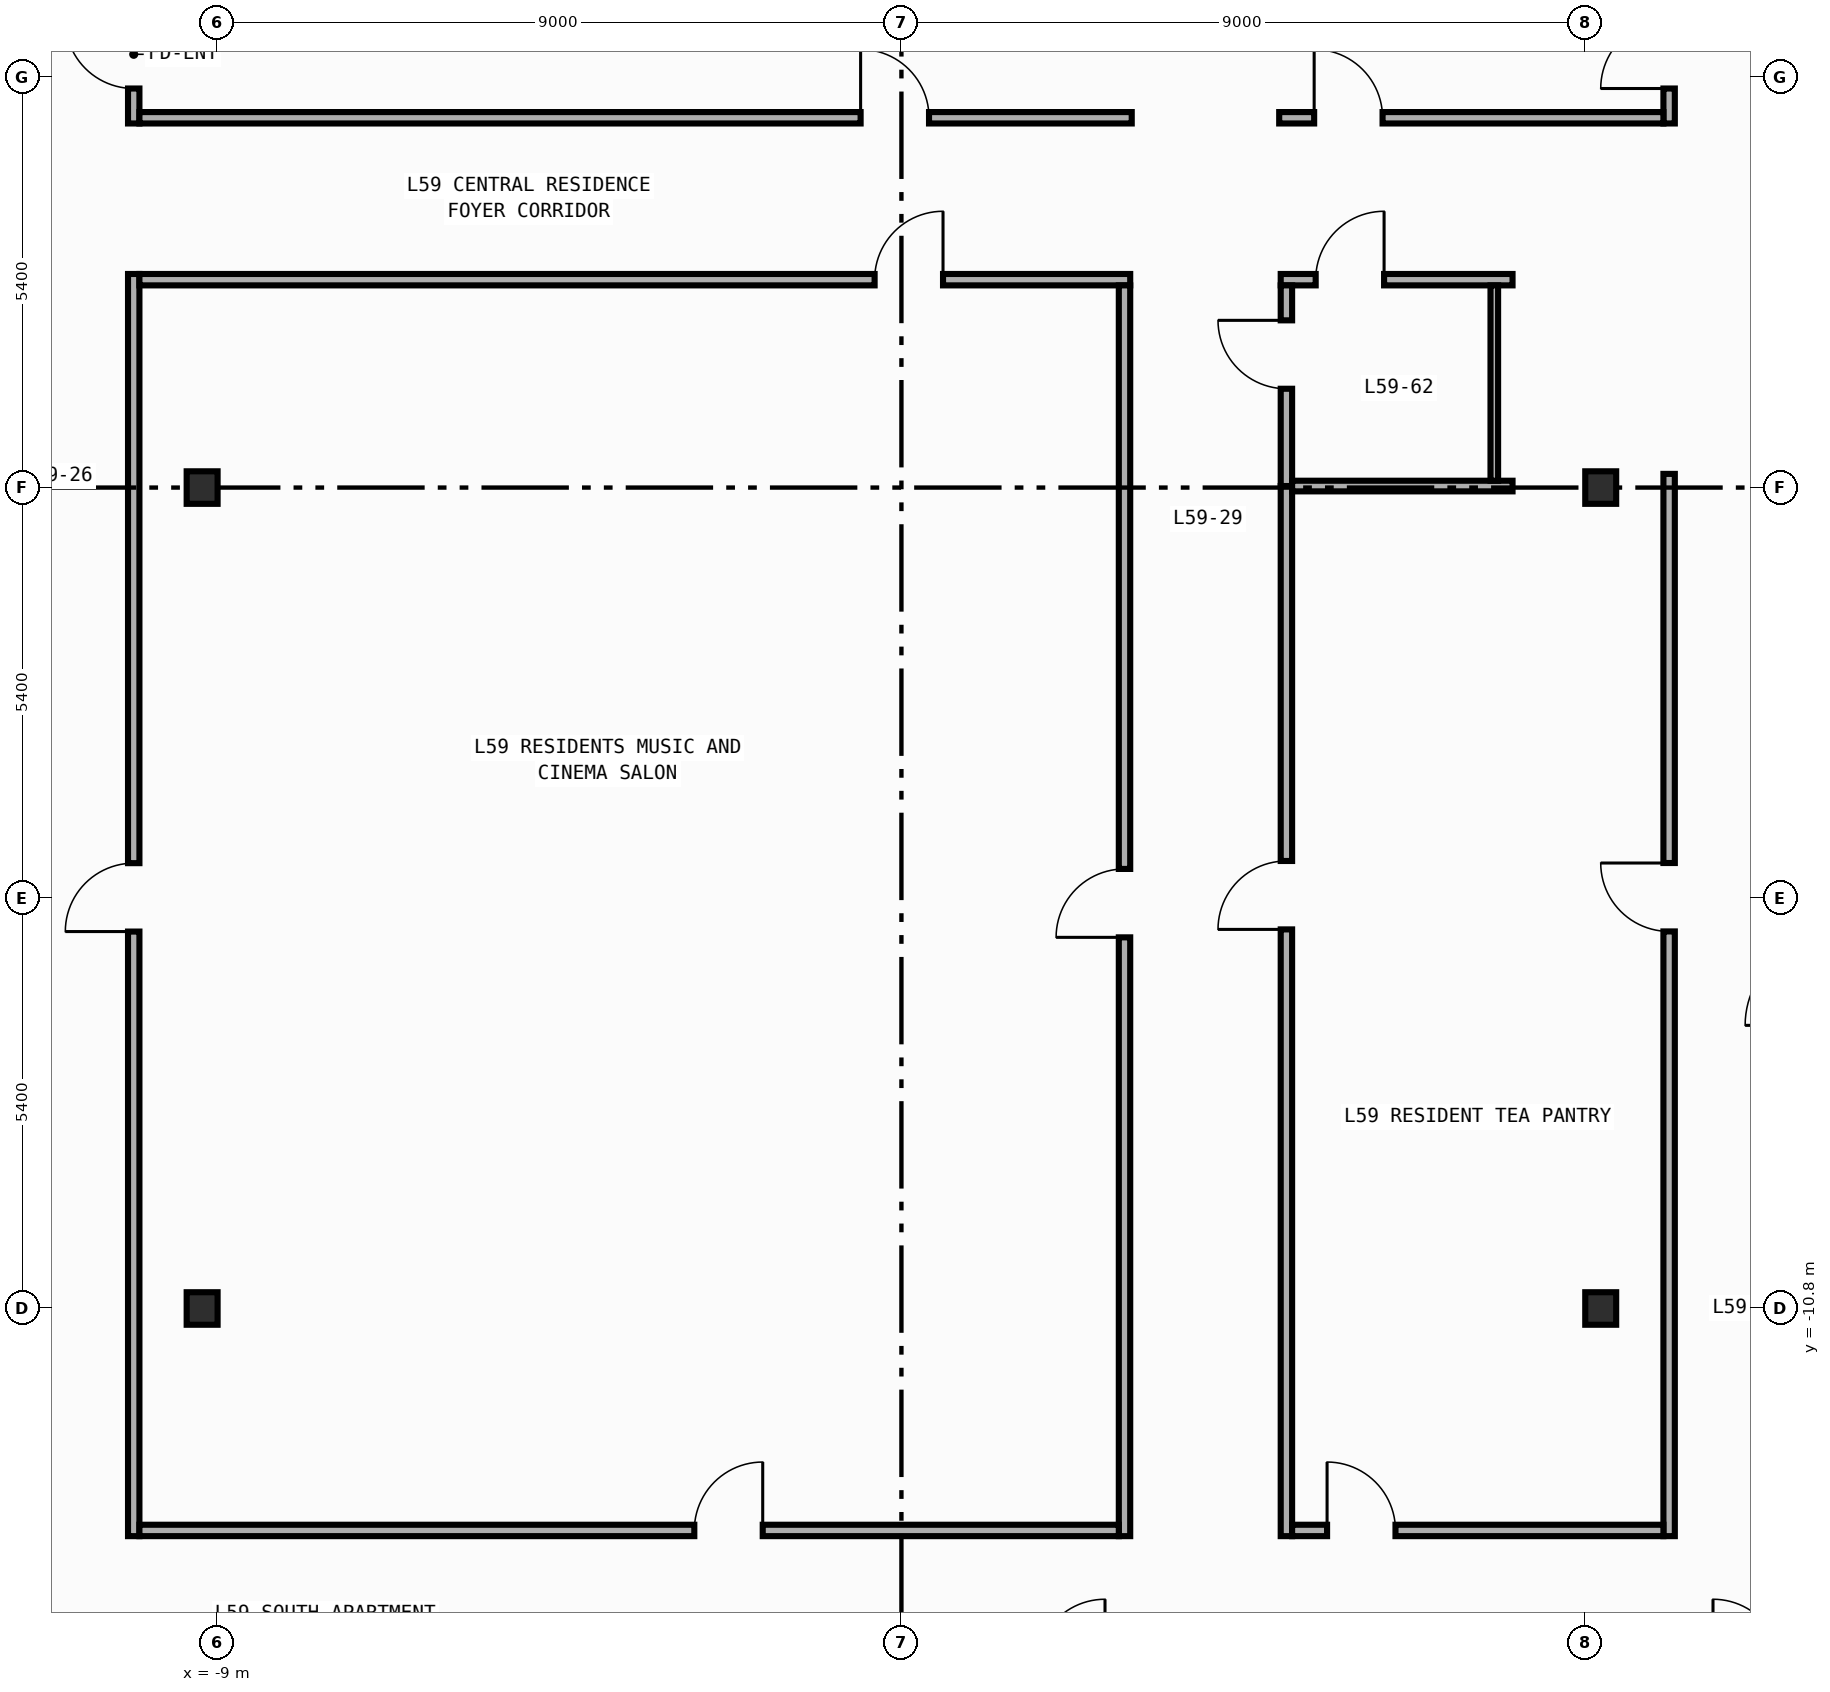
"""IFC4 building model, lengths in metres.
Left out: names, types, materials, properties, quantities, classifications, styles, units other than length and angle.
Written with IfcOpenShell. Run it as: python <this file> out.ifc"""

import sys

from ifc_helpers import new_model, si_unit, direction, frame, frame_2d, origin, origin_2d, place, context, subcontext, project, spatial, rectangle, i_section, extrude, element, fill, save


model = new_model("IFC4")
c1 = context("Model", 3, precision=1e-05, world=origin(), true_north=direction((0.0, 1.0)))
c2 = subcontext(c1, "Body", "Model", "MODEL_VIEW")
j1 = project(units=[si_unit("LENGTHUNIT", "METRE"), si_unit("PLANEANGLEUNIT", "RADIAN")], contexts=[c1])
p1 = place(None, origin())
s1 = spatial("IfcSite", under=j1, at=p1, CompositionType="ELEMENT")
p2 = place(p1, origin())
s2 = spatial("IfcBuilding", under=s1, at=p2, CompositionType="ELEMENT")
p3 = place(p2, frame((0.0, 0.0, 251.2)))
s3 = spatial("IfcBuildingStorey", under=s2, at=p3, CompositionType="ELEMENT", Elevation=251.2)
for number, where, z_axis, x_axis in (
    (1, (-9.2, -10.8, 0.0), (0.0, 0.0, 1.0), (1.0, 0.0, 0.0)),
    (2, (-9.2, 0.0, 0.0), (0.0, 0.0, 1.0), (1.0, 0.0, 0.0)),
    (3, (9.2, -10.8, 0.0), (0.0, 0.0, 1.0), (1.0, 0.0, 0.0)),
    (4, (9.2, 0.0, 0.0), (0.0, 0.0, 1.0), (1.0, 0.0, 0.0)),
):
    element("IfcColumn", number, at=place(p3, frame(where, z_axis=z_axis, x_axis=x_axis)), inside=s3, PredefinedType="COLUMN", context=c2, shape_type="SweptSolid", body=[
        extrude(i_section(OverallWidth=0.407, OverallDepth=0.428, WebThickness=0.02, FlangeThickness=0.035, FilletRadius=0.022, at=origin_2d()), origin(), (0.0, 0.0, 1.0), 3.6),
    ])
p4 = place(p3, frame((-10.1, 4.79, 0.0), z_axis=(0.0, 0.0, 1.0), x_axis=(0.0, 1.0, 0.0)))
e5 = element("IfcWall", 5, at=p4, inside=s3, PredefinedType="PARTITIONING", context=c2, shape_type="SweptSolid", body=[
    extrude(rectangle(XDim=9.005, YDim=0.15, at=frame_2d((4.502, 0.0))), origin(), (0.0, 0.0, 1.0), 3.34),
])
p5 = place(p4, frame((0.46, 0.0, 0.0)))
e6 = element("IfcOpeningElement", 6, at=p5, cuts=e5, PredefinedType="OPENING", context=c2, shape_type="SweptSolid", body=[
    extrude(rectangle(XDim=0.9, YDim=2.15, at=frame_2d((0.45, 1.075))), frame((0.0, 0.085, 0.0), z_axis=(0.0, -1.0, 0.0), x_axis=(1.0, 0.0, 0.0)), (0.0, 0.0, 1.0), 0.17),
])
p6 = place(p3, frame((-10.1, -13.795, 0.0), z_axis=(0.0, 0.0, 1.0), x_axis=(0.0, 1.0, 0.0)))
e7 = element("IfcWall", 7, at=p6, inside=s3, PredefinedType="PARTITIONING", context=c2, shape_type="SweptSolid", body=[
    extrude(rectangle(XDim=16.605, YDim=0.15, at=frame_2d((8.302, 0.0))), origin(), (0.0, 0.0, 1.0), 3.34),
])
p7 = place(p6, frame((7.954, 0.0, 0.0)))
e8 = element("IfcOpeningElement", 8, at=p7, cuts=e7, PredefinedType="OPENING", context=c2, shape_type="SweptSolid", body=[
    extrude(rectangle(XDim=0.9, YDim=2.15, at=frame_2d((0.45, 1.075))), frame((0.0, 0.085, 0.0), z_axis=(0.0, -1.0, 0.0), x_axis=(1.0, 0.0, 0.0)), (0.0, 0.0, 1.0), 0.17),
])
p8 = place(p3, frame((10.1, 4.79, 0.0), z_axis=(0.0, 0.0, 1.0), x_axis=(0.0, 1.0, 0.0)))
e9 = element("IfcWall", 9, at=p8, inside=s3, PredefinedType="PARTITIONING", context=c2, shape_type="SweptSolid", body=[
    extrude(rectangle(XDim=9.005, YDim=0.15, at=frame_2d((4.502, 0.0))), origin(), (0.0, 0.0, 1.0), 3.34),
])
p9 = place(p8, frame((0.46, 0.0, 0.0)))
e10 = element("IfcOpeningElement", 10, at=p9, cuts=e9, PredefinedType="OPENING", context=c2, shape_type="SweptSolid", body=[
    extrude(rectangle(XDim=0.9, YDim=2.15, at=frame_2d((0.45, 1.075))), frame((0.0, 0.085, 0.0), z_axis=(0.0, -1.0, 0.0), x_axis=(1.0, 0.0, 0.0)), (0.0, 0.0, 1.0), 0.17),
])
p10 = place(p3, frame((10.1, -13.795, 0.0), z_axis=(0.0, 0.0, 1.0), x_axis=(0.0, 1.0, 0.0)))
e11 = element("IfcWall", 11, at=p10, inside=s3, PredefinedType="PARTITIONING", context=c2, shape_type="SweptSolid", body=[
    extrude(rectangle(XDim=13.975, YDim=0.15, at=frame_2d((6.987, 0.0))), origin(), (0.0, 0.0, 1.0), 3.34),
])
p11 = place(p10, frame((7.956, 0.0, 0.0)))
e12 = element("IfcOpeningElement", 12, at=p11, cuts=e11, PredefinedType="OPENING", context=c2, shape_type="SweptSolid", body=[
    extrude(rectangle(XDim=0.9, YDim=2.15, at=frame_2d((0.45, 1.075))), frame((0.0, 0.085, 0.0), z_axis=(0.0, -1.0, 0.0), x_axis=(1.0, 0.0, 0.0)), (0.0, 0.0, 1.0), 0.17),
])
p12 = place(p3, frame((-10.025, 4.865, 0.0), z_axis=(0.0, 0.0, 1.0), x_axis=(1.0, 0.0, 0.0)))
e13 = element("IfcWall", 13, at=p12, inside=s3, PredefinedType="PARTITIONING", context=c2, shape_type="SweptSolid", body=[
    extrude(rectangle(XDim=13.055, YDim=0.15, at=frame_2d((6.527, 0.0))), origin(), (0.0, 0.0, 1.0), 3.34),
])
p13 = place(p12, frame((9.488, 0.0, 0.0)))
e14 = element("IfcOpeningElement", 14, at=p13, cuts=e13, PredefinedType="OPENING", context=c2, shape_type="SweptSolid", body=[
    extrude(rectangle(XDim=0.9, YDim=2.15, at=frame_2d((0.45, 1.075))), frame((0.0, 0.085, 0.0), z_axis=(0.0, -1.0, 0.0), x_axis=(1.0, 0.0, 0.0)), (0.0, 0.0, 1.0), 0.17),
])
p14 = place(p3, frame((-10.025, 2.735, 0.0), z_axis=(0.0, 0.0, 1.0), x_axis=(1.0, 0.0, 0.0)))
e15 = element("IfcWall", 15, at=p14, inside=s3, PredefinedType="PARTITIONING", context=c2, shape_type="SweptSolid", body=[
    extrude(rectangle(XDim=13.035, YDim=0.15, at=frame_2d((6.518, 0.0))), origin(), (0.0, 0.0, 1.0), 3.34),
])
p15 = place(p14, frame((9.672, 0.0, 0.0)))
e16 = element("IfcOpeningElement", 16, at=p15, cuts=e15, PredefinedType="OPENING", context=c2, shape_type="SweptSolid", body=[
    extrude(rectangle(XDim=0.9, YDim=2.15, at=frame_2d((0.45, 1.075))), frame((0.0, 0.085, 0.0), z_axis=(0.0, -1.0, 0.0), x_axis=(1.0, 0.0, 0.0)), (0.0, 0.0, 1.0), 0.17),
])
p16 = place(p3, frame((4.97, 4.865, 0.0), z_axis=(0.0, 0.0, 1.0), x_axis=(1.0, 0.0, 0.0)))
e17 = element("IfcWall", 17, at=p16, inside=s3, PredefinedType="PARTITIONING", context=c2, shape_type="SweptSolid", body=[
    extrude(rectangle(XDim=5.055, YDim=0.15, at=frame_2d((2.527, 0.0))), origin(), (0.0, 0.0, 1.0), 3.34),
])
p17 = place(p16, frame((0.46, 0.0, 0.0)))
e18 = element("IfcOpeningElement", 18, at=p17, cuts=e17, PredefinedType="OPENING", context=c2, shape_type="SweptSolid", body=[
    extrude(rectangle(XDim=0.9, YDim=2.15, at=frame_2d((0.45, 1.075))), frame((0.0, 0.085, 0.0), z_axis=(0.0, -1.0, 0.0), x_axis=(1.0, 0.0, 0.0)), (0.0, 0.0, 1.0), 0.17),
])
p18 = place(p3, frame((4.99, 2.735, 0.0), z_axis=(0.0, 0.0, 1.0), x_axis=(1.0, 0.0, 0.0)))
e19 = element("IfcWall", 19, at=p18, inside=s3, PredefinedType="PARTITIONING", context=c2, shape_type="SweptSolid", body=[
    extrude(rectangle(XDim=3.05, YDim=0.15, at=frame_2d((1.525, 0.0))), origin(), (0.0, 0.0, 1.0), 3.34),
])
p19 = place(p18, frame((0.46, 0.0, 0.0)))
e20 = element("IfcOpeningElement", 20, at=p19, cuts=e19, PredefinedType="OPENING", context=c2, shape_type="SweptSolid", body=[
    extrude(rectangle(XDim=0.9, YDim=2.15, at=frame_2d((0.45, 1.075))), frame((0.0, 0.085, 0.0), z_axis=(0.0, -1.0, 0.0), x_axis=(1.0, 0.0, 0.0)), (0.0, 0.0, 1.0), 0.17),
])
p20 = place(p3, frame((2.935, -13.795, 0.0), z_axis=(0.0, 0.0, 1.0), x_axis=(0.0, 1.0, 0.0)))
e21 = element("IfcWall", 21, at=p20, inside=s3, PredefinedType="PARTITIONING", context=c2, shape_type="SweptSolid", body=[
    extrude(rectangle(XDim=16.455, YDim=0.15, at=frame_2d((8.228, 0.0))), origin(), (0.0, 0.0, 1.0), 3.34),
])
p21 = place(p20, frame((7.878, 0.0, 0.0)))
e22 = element("IfcOpeningElement", 22, at=p21, cuts=e21, PredefinedType="OPENING", context=c2, shape_type="SweptSolid", body=[
    extrude(rectangle(XDim=0.9, YDim=2.15, at=frame_2d((0.45, 1.075))), frame((0.0, 0.085, 0.0), z_axis=(0.0, -1.0, 0.0), x_axis=(1.0, 0.0, 0.0)), (0.0, 0.0, 1.0), 0.17),
])
p22 = place(p3, frame((5.065, 0.02, 0.0), z_axis=(0.0, 0.0, 1.0), x_axis=(0.0, 1.0, 0.0)))
e23 = element("IfcWall", 23, at=p22, inside=s3, PredefinedType="PARTITIONING", context=c2, shape_type="SweptSolid", body=[
    extrude(rectangle(XDim=2.64, YDim=0.15, at=frame_2d((1.32, 0.0))), origin(), (0.0, 0.0, 1.0), 2.99),
])
p23 = place(p22, frame((1.28, 0.0, 0.0)))
e24 = element("IfcOpeningElement", 24, at=p23, cuts=e23, PredefinedType="OPENING", context=c2, shape_type="SweptSolid", body=[
    extrude(rectangle(XDim=0.9, YDim=2.15, at=frame_2d((0.45, 1.075))), frame((0.0, 0.085, 0.0), z_axis=(0.0, -1.0, 0.0), x_axis=(1.0, 0.0, 0.0)), (0.0, 0.0, 1.0), 0.17),
])
p24 = place(p3, frame((5.065, -13.795, 0.0), z_axis=(0.0, 0.0, 1.0), x_axis=(0.0, 1.0, 0.0)))
e25 = element("IfcWall", 25, at=p24, inside=s3, PredefinedType="PARTITIONING", context=c2, shape_type="SweptSolid", body=[
    extrude(rectangle(XDim=13.815, YDim=0.15, at=frame_2d((6.907, 0.0))), origin(), (0.0, 0.0, 1.0), 2.99),
])
p25 = place(p24, frame((7.982, 0.0, 0.0)))
e26 = element("IfcOpeningElement", 26, at=p25, cuts=e25, PredefinedType="OPENING", context=c2, shape_type="SweptSolid", body=[
    extrude(rectangle(XDim=0.9, YDim=2.15, at=frame_2d((0.45, 1.075))), frame((0.0, 0.085, 0.0), z_axis=(0.0, -1.0, 0.0), x_axis=(1.0, 0.0, 0.0)), (0.0, 0.0, 1.0), 0.17),
])
p26 = place(p3, frame((-10.025, -13.72, 0.0), z_axis=(0.0, 0.0, 1.0), x_axis=(1.0, 0.0, 0.0)))
e27 = element("IfcWall", 27, at=p26, inside=s3, PredefinedType="PARTITIONING", context=c2, shape_type="SweptSolid", body=[
    extrude(rectangle(XDim=12.885, YDim=0.15, at=frame_2d((6.442, 0.0))), origin(), (0.0, 0.0, 1.0), 3.34),
])
p27 = place(p26, frame((7.3, 0.0, 0.0)))
e28 = element("IfcOpeningElement", 28, at=p27, cuts=e27, PredefinedType="OPENING", context=c2, shape_type="SweptSolid", body=[
    extrude(rectangle(XDim=0.9, YDim=2.15, at=frame_2d((0.45, 1.075))), frame((0.0, 0.085, 0.0), z_axis=(0.0, -1.0, 0.0), x_axis=(1.0, 0.0, 0.0)), (0.0, 0.0, 1.0), 0.17),
])
p28 = place(p3, frame((5.14, -13.72, 0.0), z_axis=(0.0, 0.0, 1.0), x_axis=(1.0, 0.0, 0.0)))
e29 = element("IfcWall", 29, at=p28, inside=s3, PredefinedType="PARTITIONING", context=c2, shape_type="SweptSolid", body=[
    extrude(rectangle(XDim=4.885, YDim=0.15, at=frame_2d((2.442, 0.0))), origin(), (0.0, 0.0, 1.0), 3.34),
])
p29 = place(p28, frame((0.46, 0.0, 0.0)))
e30 = element("IfcOpeningElement", 30, at=p29, cuts=e29, PredefinedType="OPENING", context=c2, shape_type="SweptSolid", body=[
    extrude(rectangle(XDim=0.9, YDim=2.15, at=frame_2d((0.45, 1.075))), frame((0.0, 0.085, 0.0), z_axis=(0.0, -1.0, 0.0), x_axis=(1.0, 0.0, 0.0)), (0.0, 0.0, 1.0), 0.17),
])
p30 = place(p3, frame((5.14, 0.02, 0.0), z_axis=(0.0, 0.0, 1.0), x_axis=(1.0, 0.0, 0.0)))
e31 = element("IfcWall", 31, at=p30, inside=s3, PredefinedType="PARTITIONING", context=c2, shape_type="SweptSolid", body=[
    extrude(rectangle(XDim=2.9, YDim=0.14, at=frame_2d((1.45, 0.0))), origin(), (0.0, 0.0, 1.0), 2.44),
])
p31 = place(p3, frame((7.8, 2.66, 0.0), z_axis=(0.0, 0.0, 1.0), x_axis=(0.0, -1.0, 0.0)))
e32 = element("IfcWall", 32, at=p31, inside=s3, PredefinedType="PARTITIONING", context=c2, shape_type="SweptSolid", body=[
    extrude(rectangle(XDim=2.57, YDim=0.1, at=frame_2d((1.285, 0.0))), origin(), (0.0, 0.0, 1.0), 3.34),
])
p32 = place(p5, origin())
e33 = element("IfcDoor", 33, at=p32, inside=s3, OperationType="SINGLE_SWING_RIGHT", PredefinedType="DOOR", context=c2, shape_type="SweptSolid", body=[
    extrude(rectangle(XDim=0.9, YDim=2.15, at=frame_2d((0.45, 1.075))), frame((0.0, 0.025, 0.0), z_axis=(0.0, -1.0, 0.0), x_axis=(1.0, 0.0, 0.0)), (0.0, 0.0, 1.0), 0.05),
])
fill(e6, e33)
p33 = place(p7, origin())
e34 = element("IfcDoor", 34, at=p33, inside=s3, OperationType="SINGLE_SWING_LEFT", PredefinedType="DOOR", context=c2, shape_type="SweptSolid", body=[
    extrude(rectangle(XDim=0.9, YDim=2.15, at=frame_2d((0.45, 1.075))), frame((0.0, 0.025, 0.0), z_axis=(0.0, -1.0, 0.0), x_axis=(1.0, 0.0, 0.0)), (0.0, 0.0, 1.0), 0.05),
])
fill(e8, e34)
p34 = place(p9, origin())
e35 = element("IfcDoor", 35, at=p34, inside=s3, OperationType="SINGLE_SWING_LEFT", PredefinedType="DOOR", context=c2, shape_type="SweptSolid", body=[
    extrude(rectangle(XDim=0.9, YDim=2.15, at=frame_2d((0.45, 1.075))), frame((0.0, 0.025, 0.0), z_axis=(0.0, -1.0, 0.0), x_axis=(1.0, 0.0, 0.0)), (0.0, 0.0, 1.0), 0.05),
])
fill(e10, e35)
p35 = place(p11, origin())
e36 = element("IfcDoor", 36, at=p35, inside=s3, OperationType="SINGLE_SWING_RIGHT", PredefinedType="DOOR", context=c2, shape_type="SweptSolid", body=[
    extrude(rectangle(XDim=0.9, YDim=2.15, at=frame_2d((0.45, 1.075))), frame((0.0, 0.025, 0.0), z_axis=(0.0, -1.0, 0.0), x_axis=(1.0, 0.0, 0.0)), (0.0, 0.0, 1.0), 0.05),
])
fill(e12, e36)
p36 = place(p13, origin())
e37 = element("IfcDoor", 37, at=p36, inside=s3, OperationType="SINGLE_SWING_LEFT", PredefinedType="DOOR", context=c2, shape_type="SweptSolid", body=[
    extrude(rectangle(XDim=0.9, YDim=2.15, at=frame_2d((0.45, 1.075))), frame((0.0, 0.025, 0.0), z_axis=(0.0, -1.0, 0.0), x_axis=(1.0, 0.0, 0.0)), (0.0, 0.0, 1.0), 0.05),
])
fill(e14, e37)
p37 = place(p15, origin())
e38 = element("IfcDoor", 38, at=p37, inside=s3, OperationType="SINGLE_SWING_RIGHT", PredefinedType="DOOR", context=c2, shape_type="SweptSolid", body=[
    extrude(rectangle(XDim=0.9, YDim=2.15, at=frame_2d((0.45, 1.075))), frame((0.0, 0.025, 0.0), z_axis=(0.0, -1.0, 0.0), x_axis=(1.0, 0.0, 0.0)), (0.0, 0.0, 1.0), 0.05),
])
fill(e16, e38)
p38 = place(p17, origin())
e39 = element("IfcDoor", 39, at=p38, inside=s3, OperationType="SINGLE_SWING_LEFT", PredefinedType="DOOR", context=c2, shape_type="SweptSolid", body=[
    extrude(rectangle(XDim=0.9, YDim=2.15, at=frame_2d((0.45, 1.075))), frame((0.0, 0.025, 0.0), z_axis=(0.0, -1.0, 0.0), x_axis=(1.0, 0.0, 0.0)), (0.0, 0.0, 1.0), 0.05),
])
fill(e18, e39)
p39 = place(p19, origin())
e40 = element("IfcDoor", 40, at=p39, inside=s3, OperationType="SINGLE_SWING_RIGHT", PredefinedType="DOOR", context=c2, shape_type="SweptSolid", body=[
    extrude(rectangle(XDim=0.9, YDim=2.15, at=frame_2d((0.45, 1.075))), frame((0.0, 0.025, 0.0), z_axis=(0.0, -1.0, 0.0), x_axis=(1.0, 0.0, 0.0)), (0.0, 0.0, 1.0), 0.05),
])
fill(e20, e40)
p40 = place(p21, origin())
e41 = element("IfcDoor", 41, at=p40, inside=s3, OperationType="SINGLE_SWING_LEFT", PredefinedType="DOOR", context=c2, shape_type="SweptSolid", body=[
    extrude(rectangle(XDim=0.9, YDim=2.15, at=frame_2d((0.45, 1.075))), frame((0.0, 0.025, 0.0), z_axis=(0.0, -1.0, 0.0), x_axis=(1.0, 0.0, 0.0)), (0.0, 0.0, 1.0), 0.05),
])
fill(e22, e41)
p41 = place(p23, origin())
e42 = element("IfcDoor", 42, at=p41, inside=s3, OperationType="SINGLE_SWING_RIGHT", PredefinedType="DOOR", context=c2, shape_type="SweptSolid", body=[
    extrude(rectangle(XDim=0.9, YDim=2.15, at=frame_2d((0.45, 1.075))), frame((0.0, 0.025, 0.0), z_axis=(0.0, -1.0, 0.0), x_axis=(1.0, 0.0, 0.0)), (0.0, 0.0, 1.0), 0.05),
])
fill(e24, e42)
p42 = place(p25, origin())
e43 = element("IfcDoor", 43, at=p42, inside=s3, OperationType="SINGLE_SWING_LEFT", PredefinedType="DOOR", context=c2, shape_type="SweptSolid", body=[
    extrude(rectangle(XDim=0.9, YDim=2.15, at=frame_2d((0.45, 1.075))), frame((0.0, 0.025, 0.0), z_axis=(0.0, -1.0, 0.0), x_axis=(1.0, 0.0, 0.0)), (0.0, 0.0, 1.0), 0.05),
])
fill(e26, e43)
p43 = place(p27, origin())
e44 = element("IfcDoor", 44, at=p43, inside=s3, OperationType="SINGLE_SWING_RIGHT", PredefinedType="DOOR", context=c2, shape_type="SweptSolid", body=[
    extrude(rectangle(XDim=0.9, YDim=2.15, at=frame_2d((0.45, 1.075))), frame((0.0, 0.025, 0.0), z_axis=(0.0, -1.0, 0.0), x_axis=(1.0, 0.0, 0.0)), (0.0, 0.0, 1.0), 0.05),
])
fill(e28, e44)
p44 = place(p29, origin())
e45 = element("IfcDoor", 45, at=p44, inside=s3, OperationType="SINGLE_SWING_LEFT", PredefinedType="DOOR", context=c2, shape_type="SweptSolid", body=[
    extrude(rectangle(XDim=0.9, YDim=2.15, at=frame_2d((0.45, 1.075))), frame((0.0, 0.025, 0.0), z_axis=(0.0, -1.0, 0.0), x_axis=(1.0, 0.0, 0.0)), (0.0, 0.0, 1.0), 0.05),
])
fill(e30, e45)
save(model, sys.argv[1])
